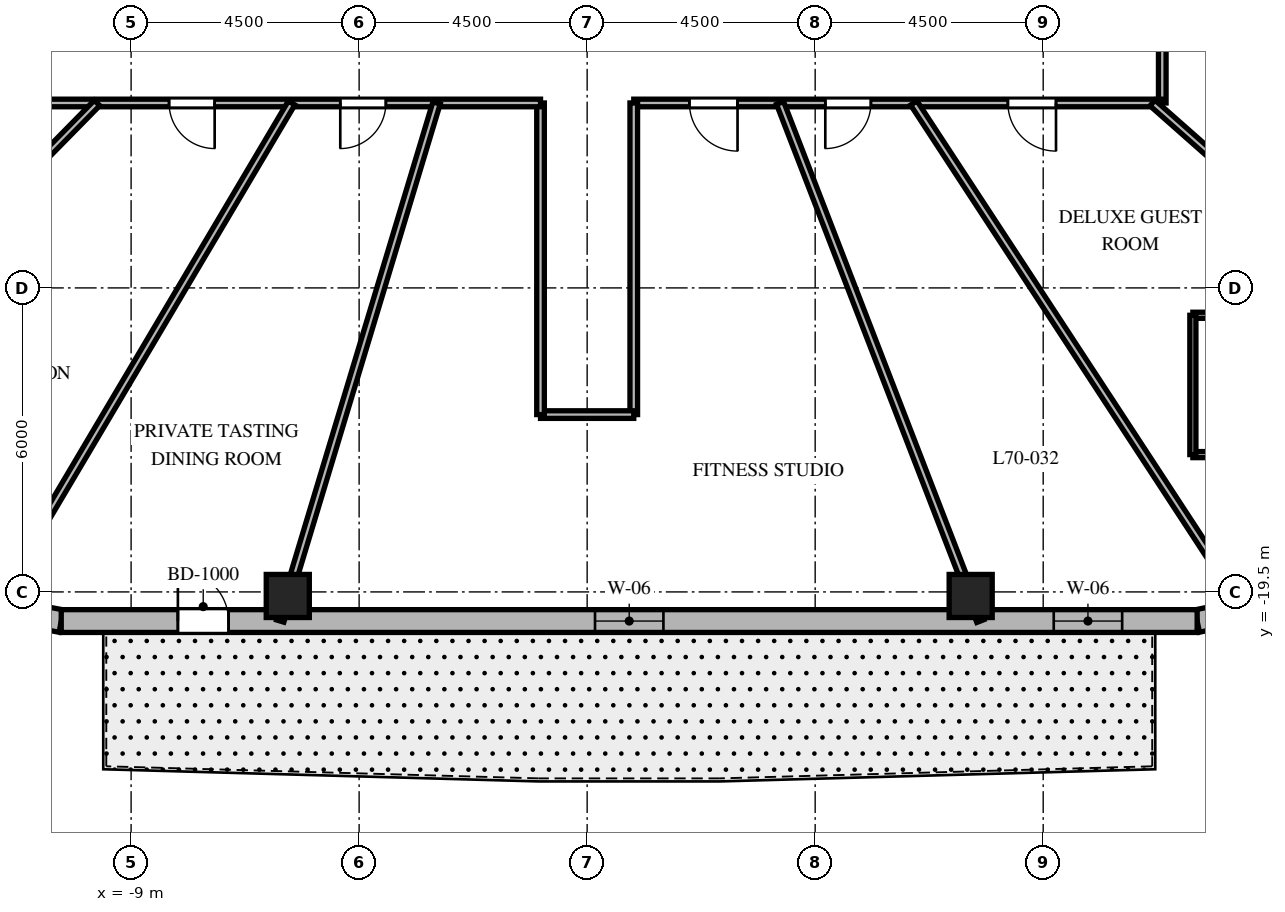
"""IFC4 building model, lengths in metres.
Left out: names, types, materials, properties, quantities, classifications, styles, units other than length and angle.
Written with IfcOpenShell. Run it as: python <this file> out.ifc"""

import sys

from ifc_helpers import new_model, si_unit, direction, frame, frame_2d, origin, origin_2d, place, context, subcontext, project, spatial, rectangle, extrude, element, fill, save


model = new_model("IFC4")
c1 = context("Model", 3, precision=1e-05, world=origin(), true_north=direction((0.0, 1.0)))
c2 = subcontext(c1, "Body", "Model", "MODEL_VIEW")
j1 = project(units=[si_unit("LENGTHUNIT", "METRE"), si_unit("PLANEANGLEUNIT", "RADIAN")], contexts=[c1])
p1 = place(None, origin())
s1 = spatial("IfcSite", under=j1, at=p1, CompositionType="ELEMENT")
p2 = place(p1, origin())
s2 = spatial("IfcBuilding", under=s1, at=p2, CompositionType="ELEMENT")
p3 = place(p2, frame((0.0, 0.0, 280.8)))
s3 = spatial("IfcBuildingStorey", under=s2, at=p3, CompositionType="ELEMENT", Elevation=280.8)
for number, where, z_axis, x_axis in (
    (1, (-5.908, -19.58, 0.0), (0.0, 0.0, 1.0), (1.0, 0.0, 0.0)),
    (2, (7.569, -19.58, 0.0), (0.0, 0.0, 1.0), (1.0, 0.0, 0.0)),
):
    element("IfcColumn", number, at=place(p3, frame(where, z_axis=z_axis, x_axis=x_axis)), inside=s3, PredefinedType="COLUMN", context=c2, shape_type="SweptSolid", body=[
        extrude(rectangle(XDim=0.85, YDim=0.85, at=origin_2d()), origin(), (0.0, 0.0, 1.0), 3.9),
    ])
p4 = place(p3, frame((-11.626, -19.84, 0.0), z_axis=(0.0, 0.0, 1.0), x_axis=(0.982701956681, -0.185194126083, 0.0)))
e3 = element("IfcWall", 3, at=p4, inside=s3, PredefinedType="SOLIDWALL", context=c2, shape_type="SweptSolid", body=[
    extrude(rectangle(XDim=1.27, YDim=0.45, at=frame_2d((0.635, 0.0))), origin(), (0.0, 0.0, 1.0), 3.6),
])
p5 = place(p3, frame((12.038, -20.075, 0.0), z_axis=(0.0, 0.0, 1.0), x_axis=(0.978750122553, 0.205056571711, 0.0)))
e4 = element("IfcWall", 4, at=p5, inside=s3, PredefinedType="SOLIDWALL", context=c2, shape_type="SweptSolid", body=[
    extrude(rectangle(XDim=1.406, YDim=0.45, at=frame_2d((0.703, 0.0))), origin(), (0.0, 0.0, 1.0), 3.6),
])
p6 = place(p3, frame((-10.379, -20.075, 0.0), z_axis=(0.0, 0.0, 1.0), x_axis=(1.0, 0.0, 0.0)))
e5 = element("IfcWall", 5, at=p6, inside=s3, PredefinedType="SOLIDWALL", context=c2, shape_type="SweptSolid", body=[
    extrude(rectangle(XDim=22.417, YDim=0.45, at=frame_2d((11.208, 0.0))), origin(), (0.0, 0.0, 1.0), 3.6),
])
p7 = place(p6, frame((2.302, 0.0, 0.0)))
e6 = element("IfcOpeningElement", 6, at=p7, cuts=e5, PredefinedType="OPENING", context=c2, shape_type="SweptSolid", body=[
    extrude(rectangle(XDim=1.0, YDim=2.15, at=frame_2d((0.5, 1.075))), frame((0.0, 0.235, 0.0), z_axis=(0.0, -1.0, 0.0), x_axis=(1.0, 0.0, 0.0)), (0.0, 0.0, 1.0), 0.47),
])
p8 = place(p6, frame((10.534, 0.0, 0.8)))
e7 = element("IfcOpeningElement", 7, at=p8, cuts=e5, PredefinedType="OPENING", context=c2, shape_type="SweptSolid", body=[
    extrude(rectangle(XDim=1.35, YDim=1.75, at=frame_2d((0.675, 0.875))), frame((0.0, 0.235, 0.0), z_axis=(0.0, -1.0, 0.0), x_axis=(1.0, 0.0, 0.0)), (0.0, 0.0, 1.0), 0.47),
])
p9 = place(p6, frame((19.587, 0.0, 0.8)))
e8 = element("IfcOpeningElement", 8, at=p9, cuts=e5, PredefinedType="OPENING", context=c2, shape_type="SweptSolid", body=[
    extrude(rectangle(XDim=1.35, YDim=1.75, at=frame_2d((0.675, 0.875))), frame((0.0, 0.235, 0.0), z_axis=(0.0, -1.0, 0.0), x_axis=(1.0, 0.0, 0.0)), (0.0, 0.0, 1.0), 0.47),
])
p10 = place(p3, frame((11.35, -4.4, 0.0), z_axis=(0.0, 0.0, 1.0), x_axis=(0.0, -1.0, 0.0)))
e9 = element("IfcWall", 9, at=p10, inside=s3, PredefinedType="PARTITIONING", context=c2, shape_type="SweptSolid", body=[
    extrude(rectangle(XDim=5.45, YDim=0.15, at=frame_2d((2.725, 0.0))), origin(), (0.0, 0.0, 1.0), 3.09),
])
p11 = place(p10, frame((2.708, 0.0, 0.0)))
e10 = element("IfcOpeningElement", 10, at=p11, cuts=e9, PredefinedType="OPENING", context=c2, shape_type="SweptSolid", body=[
    extrude(rectangle(XDim=0.9, YDim=2.03, at=frame_2d((0.45, 1.015))), frame((0.0, 0.085, 0.0), z_axis=(0.0, -1.0, 0.0), x_axis=(1.0, 0.0, 0.0)), (0.0, 0.0, 1.0), 0.17),
])
p12 = place(p3, frame((11.35, -9.85, 0.0), z_axis=(0.0, 0.0, 1.0), x_axis=(-1.0, 0.0, 0.0)))
e11 = element("IfcWall", 11, at=p12, inside=s3, PredefinedType="PARTITIONING", context=c2, shape_type="SweptSolid", body=[
    extrude(rectangle(XDim=10.43, YDim=0.15, at=frame_2d((5.215, 0.0))), origin(), (0.0, 0.0, 1.0), 3.09),
])
p13 = place(p12, frame((8.382, 0.0, 0.0)))
e12 = element("IfcOpeningElement", 12, at=p13, cuts=e11, PredefinedType="OPENING", context=c2, shape_type="SweptSolid", body=[
    extrude(rectangle(XDim=0.95, YDim=2.03, at=frame_2d((0.475, 1.015))), frame((0.0, 0.085, 0.0), z_axis=(0.0, -1.0, 0.0), x_axis=(1.0, 0.0, 0.0)), (0.0, 0.0, 1.0), 0.17),
])
p14 = place(p12, frame((5.75, 0.0, 0.0)))
e13 = element("IfcOpeningElement", 13, at=p14, cuts=e11, PredefinedType="OPENING", context=c2, shape_type="SweptSolid", body=[
    extrude(rectangle(XDim=0.9, YDim=2.03, at=frame_2d((0.45, 1.015))), frame((0.0, 0.085, 0.0), z_axis=(0.0, -1.0, 0.0), x_axis=(1.0, 0.0, 0.0)), (0.0, 0.0, 1.0), 0.17),
])
p15 = place(p12, frame((2.097, 0.0, 0.0)))
e14 = element("IfcOpeningElement", 14, at=p15, cuts=e11, PredefinedType="OPENING", context=c2, shape_type="SweptSolid", body=[
    extrude(rectangle(XDim=0.95, YDim=2.03, at=frame_2d((0.475, 1.015))), frame((0.0, 0.085, 0.0), z_axis=(0.0, -1.0, 0.0), x_axis=(1.0, 0.0, 0.0)), (0.0, 0.0, 1.0), 0.17),
])
p16 = place(p3, frame((0.92, -9.85, 0.0), z_axis=(0.0, 0.0, 1.0), x_axis=(0.0, -1.0, 0.0)))
e15 = element("IfcWall", 15, at=p16, inside=s3, PredefinedType="PARTITIONING", context=c2, shape_type="SweptSolid", body=[
    extrude(rectangle(XDim=6.15, YDim=0.15, at=frame_2d((3.075, 0.0))), origin(), (0.0, 0.0, 1.0), 3.041),
])
p17 = place(p3, frame((0.92, -16.0, 0.0), z_axis=(0.0, 0.0, 1.0), x_axis=(-1.0, 0.0, 0.0)))
e16 = element("IfcWall", 16, at=p17, inside=s3, PredefinedType="PARTITIONING", context=c2, shape_type="SweptSolid", body=[
    extrude(rectangle(XDim=1.84, YDim=0.15, at=frame_2d((0.92, 0.0))), origin(), (0.0, 0.0, 1.0), 3.6),
])
p18 = place(p3, frame((-0.92, -16.0, 0.0), z_axis=(0.0, 0.0, 1.0), x_axis=(0.0, 1.0, 0.0)))
e17 = element("IfcWall", 17, at=p18, inside=s3, PredefinedType="PARTITIONING", context=c2, shape_type="SweptSolid", body=[
    extrude(rectangle(XDim=6.15, YDim=0.15, at=frame_2d((3.075, 0.0))), origin(), (0.0, 0.0, 1.0), 3.041),
])
p19 = place(p3, frame((-0.92, -9.85, 0.0), z_axis=(0.0, 0.0, 1.0), x_axis=(-1.0, 0.0, 0.0)))
e18 = element("IfcWall", 18, at=p19, inside=s3, PredefinedType="PARTITIONING", context=c2, shape_type="SweptSolid", body=[
    extrude(rectangle(XDim=10.43, YDim=0.15, at=frame_2d((5.215, 0.0))), origin(), (0.0, 0.0, 1.0), 3.09),
])
p20 = place(p19, frame((6.431, 0.0, 0.0)))
e19 = element("IfcOpeningElement", 19, at=p20, cuts=e18, PredefinedType="OPENING", context=c2, shape_type="SweptSolid", body=[
    extrude(rectangle(XDim=0.9, YDim=2.03, at=frame_2d((0.45, 1.015))), frame((0.0, 0.085, 0.0), z_axis=(0.0, -1.0, 0.0), x_axis=(1.0, 0.0, 0.0)), (0.0, 0.0, 1.0), 0.17),
])
p21 = place(p19, frame((3.052, 0.0, 0.0)))
e20 = element("IfcOpeningElement", 20, at=p21, cuts=e18, PredefinedType="OPENING", context=c2, shape_type="SweptSolid", body=[
    extrude(rectangle(XDim=0.9, YDim=2.03, at=frame_2d((0.45, 1.015))), frame((0.0, 0.085, 0.0), z_axis=(0.0, -1.0, 0.0), x_axis=(1.0, 0.0, 0.0)), (0.0, 0.0, 1.0), 0.17),
])
p22 = place(p3, frame((-9.672, -9.85, 0.0), z_axis=(0.0, 0.0, 1.0), x_axis=(-0.700629771301, -0.713524998558, 0.0)))
e21 = element("IfcWall", 21, at=p22, inside=s3, PredefinedType="PARTITIONING", context=c2, shape_type="SweptSolid", body=[
    extrude(rectangle(XDim=7.459, YDim=0.15, at=frame_2d((3.73, 0.0))), origin(), (0.0, 0.0, 1.0), 2.94),
])
p23 = place(p3, frame((-5.833, -9.85, 0.0), z_axis=(0.0, 0.0, 1.0), x_axis=(-0.509561365941, -0.860434317272, 0.0)))
e22 = element("IfcWall", 22, at=p23, inside=s3, PredefinedType="PARTITIONING", context=c2, shape_type="SweptSolid", body=[
    extrude(rectangle(XDim=11.385, YDim=0.15, at=frame_2d((5.692, 0.0))), origin(), (0.0, 0.0, 1.0), 2.94),
])
p24 = place(p3, frame((-2.972, -9.85, 0.0), z_axis=(0.0, 0.0, 1.0), x_axis=(-0.288872169679, -0.957367677324, 0.0)))
e23 = element("IfcWall", 23, at=p24, inside=s3, PredefinedType="PARTITIONING", context=c2, shape_type="SweptSolid", body=[
    extrude(rectangle(XDim=10.68, YDim=0.15, at=frame_2d((5.34, 0.0))), origin(), (0.0, 0.0, 1.0), 2.94),
])
p25 = place(p3, frame((3.808, -9.85, 0.0), z_axis=(0.0, 0.0, 1.0), x_axis=(0.360587327934, -0.932725457427, 0.0)))
e24 = element("IfcWall", 24, at=p25, inside=s3, PredefinedType="PARTITIONING", context=c2, shape_type="SweptSolid", body=[
    extrude(rectangle(XDim=10.962, YDim=0.15, at=frame_2d((5.481, 0.0))), origin(), (0.0, 0.0, 1.0), 2.94),
])
p26 = place(p3, frame((6.446, -9.85, 0.0), z_axis=(0.0, 0.0, 1.0), x_axis=(0.547598105704, -0.836741486141, 0.0)))
e25 = element("IfcWall", 25, at=p26, inside=s3, PredefinedType="PARTITIONING", context=c2, shape_type="SweptSolid", body=[
    extrude(rectangle(XDim=11.806, YDim=0.15, at=frame_2d((5.903, 0.0))), origin(), (0.0, 0.0, 1.0), 2.94),
])
p27 = place(p3, frame((11.157, -9.85, 0.0), z_axis=(0.0, 0.0, 1.0), x_axis=(0.74966962095, -0.661812253909, 0.0)))
e26 = element("IfcWall", 26, at=p27, inside=s3, PredefinedType="PARTITIONING", context=c2, shape_type="SweptSolid", body=[
    extrude(rectangle(XDim=6.989, YDim=0.15, at=frame_2d((3.494, 0.0))), origin(), (0.0, 0.0, 1.0), 2.94),
])
p28 = place(p3, frame((11.35, -5.507, 0.0), z_axis=(0.0, 0.0, 1.0), x_axis=(0.899708724615, -0.436490791256, 0.0)))
e27 = element("IfcWall", 27, at=p28, inside=s3, PredefinedType="PARTITIONING", context=c2, shape_type="SweptSolid", body=[
    extrude(rectangle(XDim=7.746, YDim=0.15, at=frame_2d((3.873, 0.0))), origin(), (0.0, 0.0, 1.0), 2.94),
])
p29 = place(p3, frame((11.954, -16.79, 0.0), z_axis=(0.0, 0.0, 1.0), x_axis=(1.0, 0.0, 0.0)))
e28 = element("IfcWall", 28, at=p29, inside=s3, PredefinedType="PARTITIONING", context=c2, shape_type="SweptSolid", body=[
    extrude(rectangle(XDim=2.6, YDim=0.12, at=frame_2d((1.3, 0.0))), origin(), (0.0, 0.0, 1.0), 2.94),
])
p30 = place(p29, frame((0.875, 0.0, 0.0)))
e29 = element("IfcOpeningElement", 29, at=p30, cuts=e28, PredefinedType="OPENING", context=c2, shape_type="SweptSolid", body=[
    extrude(rectangle(XDim=0.85, YDim=2.03, at=frame_2d((0.425, 1.015))), frame((0.0, 0.07, 0.0), z_axis=(0.0, -1.0, 0.0), x_axis=(1.0, 0.0, 0.0)), (0.0, 0.0, 1.0), 0.14),
])
p31 = place(p3, frame((14.554, -14.04, 0.0), z_axis=(0.0, 0.0, 1.0), x_axis=(-1.0, 0.0, 0.0)))
e30 = element("IfcWall", 30, at=p31, inside=s3, PredefinedType="PARTITIONING", context=c2, shape_type="SweptSolid", body=[
    extrude(rectangle(XDim=2.6, YDim=0.12, at=frame_2d((1.3, 0.0))), origin(), (0.0, 0.0, 1.0), 3.6),
])
p32 = place(p3, frame((11.954, -14.04, 0.0), z_axis=(0.0, 0.0, 1.0), x_axis=(0.0, -1.0, 0.0)))
e31 = element("IfcWall", 31, at=p32, inside=s3, PredefinedType="PARTITIONING", context=c2, shape_type="SweptSolid", body=[
    extrude(rectangle(XDim=2.75, YDim=0.12, at=frame_2d((1.375, 0.0))), origin(), (0.0, 0.0, 1.0), 2.94),
])
p33 = place(p7, origin())
e32 = element("IfcDoor", 32, at=p33, inside=s3, OperationType="SINGLE_SWING_LEFT", PredefinedType="DOOR", context=c2, shape_type="SweptSolid", body=[
    extrude(rectangle(XDim=1.0, YDim=2.15, at=frame_2d((0.5, 1.075))), frame((0.0, 0.025, 0.0), z_axis=(0.0, -1.0, 0.0), x_axis=(1.0, 0.0, 0.0)), (0.0, 0.0, 1.0), 0.05),
])
fill(e6, e32)
p34 = place(p8, origin())
e33 = element("IfcWindow", 33, at=p34, inside=s3, PartitioningType="SINGLE_PANEL", PredefinedType="WINDOW", context=c2, shape_type="SweptSolid", body=[
    extrude(rectangle(XDim=1.35, YDim=1.75, at=frame_2d((0.675, 0.875))), frame((0.0, 0.03, 0.0), z_axis=(0.0, -1.0, 0.0), x_axis=(1.0, 0.0, 0.0)), (0.0, 0.0, 1.0), 0.06),
])
fill(e7, e33)
p35 = place(p9, origin())
e34 = element("IfcWindow", 34, at=p35, inside=s3, PartitioningType="SINGLE_PANEL", PredefinedType="WINDOW", context=c2, shape_type="SweptSolid", body=[
    extrude(rectangle(XDim=1.35, YDim=1.75, at=frame_2d((0.675, 0.875))), frame((0.0, 0.03, 0.0), z_axis=(0.0, -1.0, 0.0), x_axis=(1.0, 0.0, 0.0)), (0.0, 0.0, 1.0), 0.06),
])
fill(e8, e34)
p36 = place(p20, origin())
e35 = element("IfcDoor", 35, at=p36, inside=s3, OperationType="SINGLE_SWING_LEFT", PredefinedType="DOOR", context=c2, shape_type="SweptSolid", body=[
    extrude(rectangle(XDim=0.9, YDim=2.03, at=frame_2d((0.45, 1.015))), frame((0.0, 0.025, 0.0), z_axis=(0.0, -1.0, 0.0), x_axis=(1.0, 0.0, 0.0)), (0.0, 0.0, 1.0), 0.05),
])
fill(e19, e35)
p37 = place(p21, origin())
e36 = element("IfcDoor", 36, at=p37, inside=s3, OperationType="SINGLE_SWING_RIGHT", PredefinedType="DOOR", context=c2, shape_type="SweptSolid", body=[
    extrude(rectangle(XDim=0.9, YDim=2.03, at=frame_2d((0.45, 1.015))), frame((0.0, 0.025, 0.0), z_axis=(0.0, -1.0, 0.0), x_axis=(1.0, 0.0, 0.0)), (0.0, 0.0, 1.0), 0.05),
])
fill(e20, e36)
p38 = place(p13, origin())
e37 = element("IfcDoor", 37, at=p38, inside=s3, OperationType="SINGLE_SWING_LEFT", PredefinedType="DOOR", context=c2, shape_type="SweptSolid", body=[
    extrude(rectangle(XDim=0.95, YDim=2.03, at=frame_2d((0.475, 1.015))), frame((0.0, 0.025, 0.0), z_axis=(0.0, -1.0, 0.0), x_axis=(1.0, 0.0, 0.0)), (0.0, 0.0, 1.0), 0.05),
])
fill(e12, e37)
p39 = place(p14, origin())
e38 = element("IfcDoor", 38, at=p39, inside=s3, OperationType="SINGLE_SWING_RIGHT", PredefinedType="DOOR", context=c2, shape_type="SweptSolid", body=[
    extrude(rectangle(XDim=0.9, YDim=2.03, at=frame_2d((0.45, 1.015))), frame((0.0, 0.025, 0.0), z_axis=(0.0, -1.0, 0.0), x_axis=(1.0, 0.0, 0.0)), (0.0, 0.0, 1.0), 0.05),
])
fill(e13, e38)
p40 = place(p15, origin())
e39 = element("IfcDoor", 39, at=p40, inside=s3, OperationType="SINGLE_SWING_LEFT", PredefinedType="DOOR", context=c2, shape_type="SweptSolid", body=[
    extrude(rectangle(XDim=0.95, YDim=2.03, at=frame_2d((0.475, 1.015))), frame((0.0, 0.025, 0.0), z_axis=(0.0, -1.0, 0.0), x_axis=(1.0, 0.0, 0.0)), (0.0, 0.0, 1.0), 0.05),
])
fill(e14, e39)
save(model, sys.argv[1])
